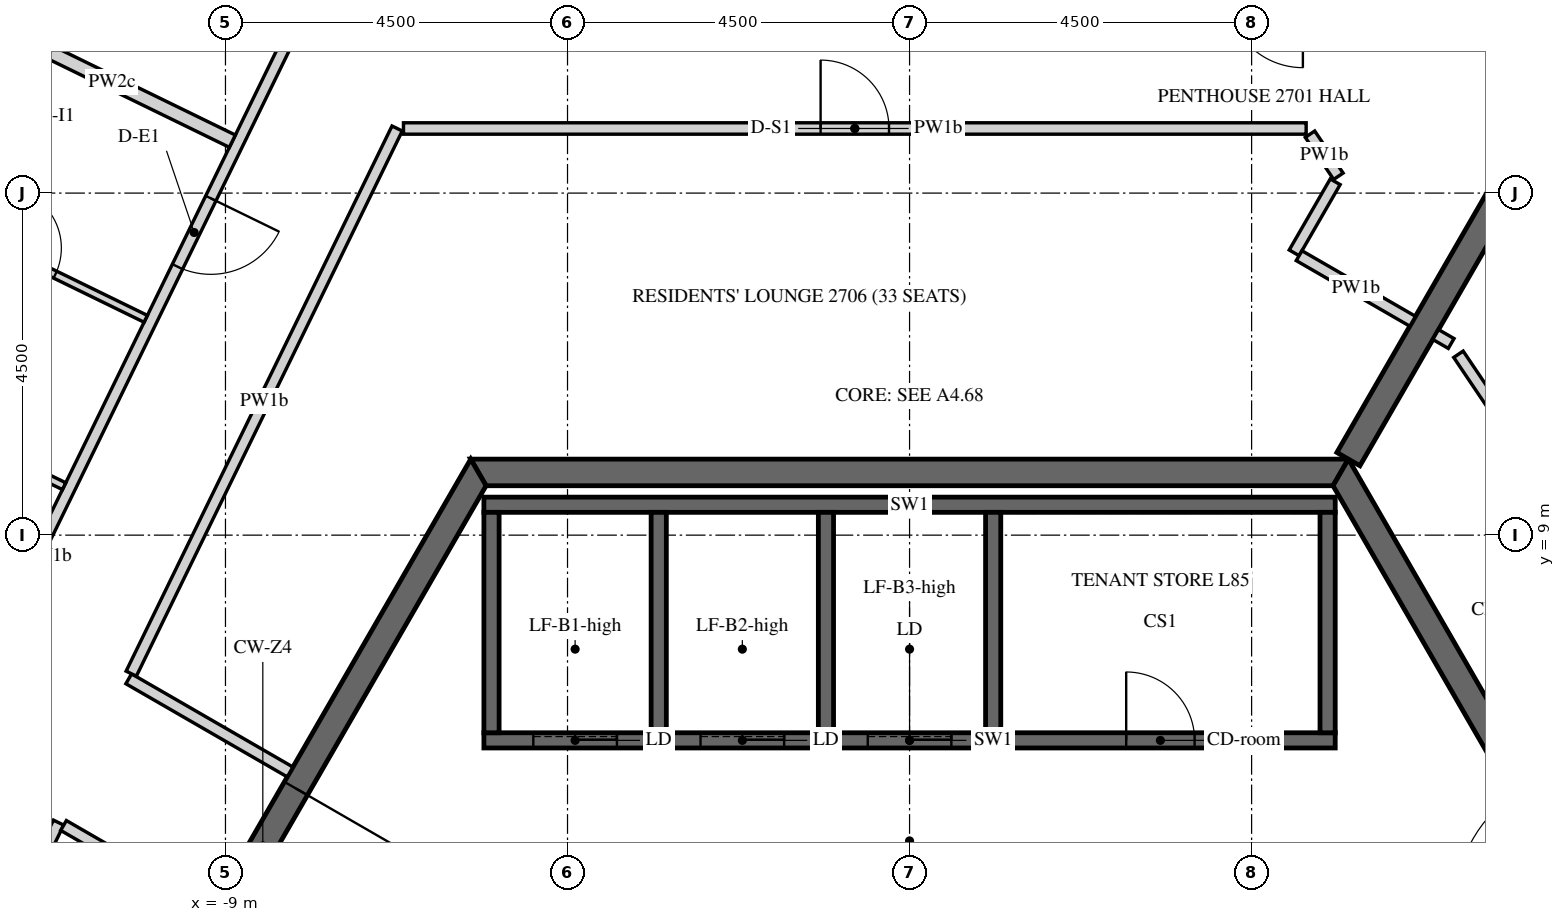
"""IFC4 building model, lengths in metres.
Left out: names, types, materials, properties, quantities, classifications, styles, units other than length and angle.
Written with IfcOpenShell. Run it as: python <this file> out.ifc"""

import sys

from ifc_helpers import new_model, si_unit, direction, frame, frame_2d, origin, place, context, subcontext, project, spatial, polyline, rectangle, outline, extrude, element, fill, save


model = new_model("IFC4")
c1 = context("Model", 3, precision=1e-05, world=origin(), true_north=direction((0.0, 1.0)))
c2 = subcontext(c1, "Body", "Model", "MODEL_VIEW")
j1 = project(units=[si_unit("LENGTHUNIT", "METRE"), si_unit("PLANEANGLEUNIT", "RADIAN")], contexts=[c1])
p1 = place(None, origin())
s1 = spatial("IfcSite", under=j1, at=p1, CompositionType="ELEMENT")
p2 = place(p1, origin())
s2 = spatial("IfcBuilding", under=s1, at=p2, CompositionType="ELEMENT")
p3 = place(p2, frame((0.0, 0.0, 353.4)))
s3 = spatial("IfcBuildingStorey", under=s2, at=p3, CompositionType="ELEMENT", Elevation=353.4)
p4 = place(p3, frame((-5.673, 9.825, -0.15), z_axis=(0.0, 0.0, 1.0), x_axis=(-0.499995046907, -0.866028263435, 0.0)))
e1 = element("IfcWall", 1, at=p4, inside=s3, PredefinedType="SHEAR", context=c2, shape_type="SweptSolid", body=[
    extrude(outline(polyline([(-0.101, -0.175), (11.446, -0.175), (11.244, 0.175), (0.101, 0.175), (-0.101, -0.175)])), origin(), (0.0, 0.0, 1.0), 3.9),
])
p5 = place(p4, frame((4.801, 0.0, 0.15)))
e2 = element("IfcOpeningElement", 2, at=p5, cuts=e1, PredefinedType="OPENING", context=c2, shape_type="SweptSolid", body=[
    extrude(rectangle(XDim=1.8, YDim=2.4, at=frame_2d((0.9, 1.2))), frame((0.0, 0.185, 0.0), z_axis=(0.0, -1.0, 0.0), x_axis=(1.0, 0.0, 0.0)), (0.0, 0.0, 1.0), 0.37),
])
p6 = place(p3, frame((11.345, 0.0, -0.15), z_axis=(0.0, 0.0, 1.0), x_axis=(-0.499995046907, 0.866028263435, 0.0)))
e3 = element("IfcWall", 3, at=p6, inside=s3, PredefinedType="SHEAR", context=c2, shape_type="SweptSolid", body=[
    extrude(outline(polyline([(-0.101, -0.175), (11.446, -0.175), (11.244, 0.175), (0.101, 0.175), (-0.101, -0.175)])), origin(), (0.0, 0.0, 1.0), 3.9),
])
p7 = place(p6, frame((4.744, 0.0, 0.15)))
e4 = element("IfcOpeningElement", 4, at=p7, cuts=e3, PredefinedType="OPENING", context=c2, shape_type="SweptSolid", body=[
    extrude(rectangle(XDim=1.8, YDim=2.4, at=frame_2d((0.9, 1.2))), frame((0.0, 0.185, 0.0), z_axis=(0.0, -1.0, 0.0), x_axis=(1.0, 0.0, 0.0)), (0.0, 0.0, 1.0), 0.37),
])
p8 = place(p3, frame((5.673, 9.825, -0.15), z_axis=(0.0, 0.0, 1.0), x_axis=(-1.0, 0.0, 0.0)))
e5 = element("IfcWall", 5, at=p8, inside=s3, PredefinedType="SHEAR", context=c2, shape_type="SweptSolid", body=[
    extrude(outline(polyline([(-0.101, -0.175), (11.446, -0.175), (11.244, 0.175), (0.101, 0.175), (-0.101, -0.175)])), origin(), (0.0, 0.0, 1.0), 3.9),
])
p9 = place(p3, frame((5.773, 10.0, -0.15), z_axis=(0.0, 0.0, 1.0), x_axis=(0.500007911273, 0.866020836161, 0.0)))
e6 = element("IfcWall", 6, at=p9, inside=s3, PredefinedType="SHEAR", context=c2, shape_type="SweptSolid", body=[
    extrude(rectangle(XDim=14.51, YDim=0.35, at=frame_2d((7.255, 0.0))), origin(), (0.0, 0.0, 1.0), 3.9),
])
p10 = place(p9, frame((6.355, 0.0, 0.15)))
e7 = element("IfcOpeningElement", 7, at=p10, cuts=e6, PredefinedType="OPENING", context=c2, shape_type="SweptSolid", body=[
    extrude(rectangle(XDim=1.8, YDim=2.4, at=frame_2d((0.9, 1.2))), frame((0.0, 0.185, 0.0), z_axis=(0.0, -1.0, 0.0), x_axis=(1.0, 0.0, 0.0)), (0.0, 0.0, 1.0), 0.37),
])
p11 = place(p3, frame((-5.6, 6.3, -0.25), z_axis=(0.0, 0.0, 1.0), x_axis=(1.0, 0.0, 0.0)))
e8 = element("IfcWall", 8, at=p11, inside=s3, PredefinedType="SHEAR", context=c2, shape_type="SweptSolid", body=[
    extrude(rectangle(XDim=11.2, YDim=0.2, at=frame_2d((5.6, 0.0))), origin(), (0.0, 0.0, 1.0), 3.9),
])
p12 = place(p11, frame((8.45, 0.0, 0.25)))
e9 = element("IfcOpeningElement", 9, at=p12, cuts=e8, PredefinedType="OPENING", context=c2, shape_type="SweptSolid", body=[
    extrude(rectangle(XDim=0.9, YDim=2.1, at=frame_2d((0.45, 1.05))), frame((0.0, 0.11, 0.0), z_axis=(0.0, -1.0, 0.0), x_axis=(1.0, 0.0, 0.0)), (0.0, 0.0, 1.0), 0.22),
])
p13 = place(p11, frame((0.65, 0.0, 0.25)))
e10 = element("IfcOpeningElement", 10, at=p13, cuts=e8, PredefinedType="OPENING", context=c2, shape_type="SweptSolid", body=[
    extrude(rectangle(XDim=1.1, YDim=2.1, at=frame_2d((0.55, 1.05))), frame((0.0, 0.11, 0.0), z_axis=(0.0, -1.0, 0.0), x_axis=(1.0, 0.0, 0.0)), (0.0, 0.0, 1.0), 0.22),
])
p14 = place(p11, frame((2.85, 0.0, 0.25)))
e11 = element("IfcOpeningElement", 11, at=p14, cuts=e8, PredefinedType="OPENING", context=c2, shape_type="SweptSolid", body=[
    extrude(rectangle(XDim=1.1, YDim=2.1, at=frame_2d((0.55, 1.05))), frame((0.0, 0.11, 0.0), z_axis=(0.0, -1.0, 0.0), x_axis=(1.0, 0.0, 0.0)), (0.0, 0.0, 1.0), 0.22),
])
p15 = place(p11, frame((5.05, 0.0, 0.25)))
e12 = element("IfcOpeningElement", 12, at=p15, cuts=e8, PredefinedType="OPENING", context=c2, shape_type="SweptSolid", body=[
    extrude(rectangle(XDim=1.1, YDim=2.1, at=frame_2d((0.55, 1.05))), frame((0.0, 0.11, 0.0), z_axis=(0.0, -1.0, 0.0), x_axis=(1.0, 0.0, 0.0)), (0.0, 0.0, 1.0), 0.22),
])
p16 = place(p3, frame((-5.6, 9.4, -0.25), z_axis=(0.0, 0.0, 1.0), x_axis=(1.0, 0.0, 0.0)))
e13 = element("IfcWall", 13, at=p16, inside=s3, PredefinedType="SHEAR", context=c2, shape_type="SweptSolid", body=[
    extrude(rectangle(XDim=11.2, YDim=0.2, at=frame_2d((5.6, 0.0))), origin(), (0.0, 0.0, 1.0), 3.9),
])
for number, where, z_axis, x_axis in (
    (14, (-5.5, 6.4, -0.25), (0.0, 0.0, 1.0), (0.0, 1.0, 0.0)),
    (15, (-3.3, 6.4, -0.25), (0.0, 0.0, 1.0), (0.0, 1.0, 0.0)),
    (16, (-1.1, 6.4, -0.25), (0.0, 0.0, 1.0), (0.0, 1.0, 0.0)),
    (17, (1.1, 6.4, -0.25), (0.0, 0.0, 1.0), (0.0, 1.0, 0.0)),
    (18, (5.5, 6.4, -0.25), (0.0, 0.0, 1.0), (0.0, 1.0, 0.0)),
):
    element("IfcWall", number, at=place(p3, frame(where, z_axis=z_axis, x_axis=x_axis)), inside=s3, PredefinedType="SHEAR", context=c2, shape_type="SweptSolid", body=[
        extrude(rectangle(XDim=2.9, YDim=0.2, at=frame_2d((1.45, 0.0))), origin(), (0.0, 0.0, 1.0), 3.9),
    ])
p17 = place(p3, frame((-7.903, 16.075, 0.0), z_axis=(0.0, 0.0, 1.0), x_axis=(-0.438364761272, -0.898797160696, 0.0)))
e19 = element("IfcWall", 19, at=p17, inside=s3, PredefinedType="PARTITIONING", context=c2, shape_type="SweptSolid", body=[
    extrude(rectangle(XDim=15.688, YDim=0.15, at=frame_2d((7.844, 0.0))), origin(), (0.0, 0.0, 1.0), 2.82),
])
p18 = place(p17, frame((2.942, 0.0, 0.0)))
e20 = element("IfcOpeningElement", 20, at=p18, cuts=e19, PredefinedType="OPENING", context=c2, shape_type="SweptSolid", body=[
    extrude(rectangle(XDim=1.0, YDim=2.1, at=frame_2d((0.5, 1.05))), frame((0.0, 0.085, 0.0), z_axis=(0.0, -1.0, 0.0), x_axis=(1.0, 0.0, 0.0)), (0.0, 0.0, 1.0), 0.17),
])
p19 = place(p3, frame((-13.466, 0.564, 0.0), z_axis=(0.0, 0.0, 1.0), x_axis=(0.438366040624, 0.898796536724, 0.0)))
e21 = element("IfcWall", 21, at=p19, inside=s3, PredefinedType="PARTITIONING", context=c2, shape_type="SweptSolid", body=[
    extrude(rectangle(XDim=5.178, YDim=0.15, at=frame_2d((2.589, 0.0))), origin(), (0.0, 0.0, 1.0), 2.82),
])
p20 = place(p3, frame((-11.131, 5.18, 0.0), z_axis=(0.0, 0.0, 1.0), x_axis=(0.866037886895, -0.499978377995, 0.0)))
e22 = element("IfcWall", 22, at=p20, inside=s3, PredefinedType="PARTITIONING", context=c2, shape_type="SweptSolid", body=[
    extrude(rectangle(XDim=2.229, YDim=0.15, at=frame_2d((1.115, 0.0))), origin(), (0.0, 0.0, 1.0), 2.82),
])
p21 = place(p3, frame((-8.15, 5.884, 0.0), z_axis=(0.0, 0.0, 1.0), x_axis=(-0.866009790468, 0.500027042082, 0.0)))
e23 = element("IfcWall", 23, at=p21, inside=s3, PredefinedType="PARTITIONING", context=c2, shape_type="SweptSolid", body=[
    extrude(rectangle(XDim=2.451, YDim=0.15, at=frame_2d((1.226, 0.0))), origin(), (0.0, 0.0, 1.0), 2.82),
])
p22 = place(p3, frame((-10.24, 7.178, 0.0), z_axis=(0.0, 0.0, 1.0), x_axis=(0.438356120288, 0.898801375058, 0.0)))
e24 = element("IfcWall", 24, at=p22, inside=s3, PredefinedType="PARTITIONING", context=c2, shape_type="SweptSolid", body=[
    extrude(rectangle(XDim=7.98, YDim=0.15, at=frame_2d((3.99, 0.0))), origin(), (0.0, 0.0, 1.0), 2.82),
])
p23 = place(p3, frame((-6.658, 14.35, 0.0), z_axis=(0.0, 0.0, 1.0), x_axis=(1.0, 0.0, 0.0)))
e25 = element("IfcWall", 25, at=p23, inside=s3, PredefinedType="PARTITIONING", context=c2, shape_type="SweptSolid", body=[
    extrude(rectangle(XDim=11.876, YDim=0.15, at=frame_2d((5.938, 0.0))), origin(), (0.0, 0.0, 1.0), 2.82),
])
p24 = place(p23, frame((5.488, 0.0, 0.0)))
e26 = element("IfcOpeningElement", 26, at=p24, cuts=e25, PredefinedType="OPENING", context=c2, shape_type="SweptSolid", body=[
    extrude(rectangle(XDim=0.9, YDim=2.1, at=frame_2d((0.45, 1.05))), frame((0.0, 0.085, 0.0), z_axis=(0.0, -1.0, 0.0), x_axis=(1.0, 0.0, 0.0)), (0.0, 0.0, 1.0), 0.17),
])
p25 = place(p3, frame((5.268, 14.275, 0.0), z_axis=(0.0, 0.0, 1.0), x_axis=(0.559416337009, -0.828886820915, 0.0)))
e27 = element("IfcWall", 27, at=p25, inside=s3, PredefinedType="PARTITIONING", context=c2, shape_type="SweptSolid", body=[
    extrude(rectangle(XDim=0.668, YDim=0.15, at=frame_2d((0.334, 0.0))), origin(), (0.0, 0.0, 1.0), 2.82),
])
p26 = place(p3, frame((5.6, 13.649, 0.0), z_axis=(0.0, 0.0, 1.0), x_axis=(-0.500126914667, -0.865952117167, 0.0)))
e28 = element("IfcWall", 28, at=p26, inside=s3, PredefinedType="PARTITIONING", context=c2, shape_type="SweptSolid", body=[
    extrude(rectangle(XDim=1.08, YDim=0.15, at=frame_2d((0.54, 0.0))), origin(), (0.0, 0.0, 1.0), 2.82),
])
p27 = place(p3, frame((5.125, 12.677, 0.0), z_axis=(0.0, 0.0, 1.0), x_axis=(0.866013532718, -0.500020560727, 0.0)))
e29 = element("IfcWall", 29, at=p27, inside=s3, PredefinedType="PARTITIONING", context=c2, shape_type="SweptSolid", body=[
    extrude(rectangle(XDim=1.725, YDim=0.15, at=frame_2d((0.863, 0.0))), origin(), (0.0, 0.0, 1.0), 2.82),
])
p28 = place(p3, frame((6.922, 11.639, 0.0), z_axis=(0.0, 0.0, 1.0), x_axis=(0.866254745882, -0.499602557277, 0.0)))
e30 = element("IfcWall", 30, at=p28, inside=s3, PredefinedType="PARTITIONING", context=c2, shape_type="SweptSolid", body=[
    extrude(rectangle(XDim=0.235, YDim=0.15, at=frame_2d((0.118, 0.0))), origin(), (0.0, 0.0, 1.0), 2.82),
])
p29 = place(p3, frame((7.221, 11.38, 0.0), z_axis=(0.0, 0.0, 1.0), x_axis=(0.559200548931, -0.829032415576, 0.0)))
e31 = element("IfcWall", 31, at=p29, inside=s3, PredefinedType="PARTITIONING", context=c2, shape_type="SweptSolid", body=[
    extrude(rectangle(XDim=5.236, YDim=0.15, at=frame_2d((2.618, 0.0))), origin(), (0.0, 0.0, 1.0), 2.82),
])
p30 = place(p29, frame((2.168, 0.0, 0.0)))
e32 = element("IfcOpeningElement", 32, at=p30, cuts=e31, PredefinedType="OPENING", context=c2, shape_type="SweptSolid", body=[
    extrude(rectangle(XDim=0.9, YDim=2.1, at=frame_2d((0.45, 1.05))), frame((0.0, 0.085, 0.0), z_axis=(0.0, -1.0, 0.0), x_axis=(1.0, 0.0, 0.0)), (0.0, 0.0, 1.0), 0.17),
])
p31 = place(p3, frame((-12.078, 15.728, 0.0), z_axis=(0.0, 0.0, 1.0), x_axis=(0.898802391248, -0.438354036696, 0.0)))
e33 = element("IfcWall", 33, at=p31, inside=s3, PredefinedType="PARTITIONING", context=c2, shape_type="SweptSolid", body=[
    extrude(rectangle(XDim=3.525, YDim=0.18, at=frame_2d((1.762, 0.0))), origin(), (0.0, 0.0, 1.0), 2.82),
])
p32 = place(p3, frame((-13.217, 13.391, 0.0), z_axis=(0.0, 0.0, 1.0), x_axis=(0.898775101867, -0.438409986501, 0.0)))
e34 = element("IfcWall", 34, at=p32, inside=s3, PredefinedType="PARTITIONING", context=c2, shape_type="SweptSolid", body=[
    extrude(rectangle(XDim=3.525, YDim=0.1, at=frame_2d((1.763, 0.0))), origin(), (0.0, 0.0, 1.0), 2.82),
])
p33 = place(p32, frame((1.4, 0.0, 0.0)))
e35 = element("IfcOpeningElement", 35, at=p33, cuts=e34, PredefinedType="OPENING", context=c2, shape_type="SweptSolid", body=[
    extrude(rectangle(XDim=0.8, YDim=2.1, at=frame_2d((0.4, 1.05))), frame((0.0, 0.06, 0.0), z_axis=(0.0, -1.0, 0.0), x_axis=(1.0, 0.0, 0.0)), (0.0, 0.0, 1.0), 0.12),
])
p34 = place(p3, frame((-14.246, 11.167, 0.0), z_axis=(0.0, 0.0, 1.0), x_axis=(0.89880963085, -0.438339192283, 0.0)))
e36 = element("IfcWall", 36, at=p34, inside=s3, PredefinedType="PARTITIONING", context=c2, shape_type="SweptSolid", body=[
    extrude(rectangle(XDim=3.475, YDim=0.1, at=frame_2d((1.737, 0.0))), origin(), (0.0, 0.0, 1.0), 2.82),
])
p35 = place(p5, origin())
e37 = element("IfcDoor", 37, at=p35, inside=s3, OperationType="DOUBLE_DOOR_SINGLE_SWING", PredefinedType="DOOR", context=c2, shape_type="SweptSolid", body=[
    extrude(rectangle(XDim=1.8, YDim=2.4, at=frame_2d((0.9, 1.2))), frame((0.0, 0.025, 0.0), z_axis=(0.0, -1.0, 0.0), x_axis=(1.0, 0.0, 0.0)), (0.0, 0.0, 1.0), 0.05),
])
fill(e2, e37)
p36 = place(p12, origin())
e38 = element("IfcDoor", 38, at=p36, inside=s3, OperationType="SINGLE_SWING_LEFT", PredefinedType="DOOR", context=c2, shape_type="SweptSolid", body=[
    extrude(rectangle(XDim=0.9, YDim=2.1, at=frame_2d((0.45, 1.05))), frame((0.0, 0.025, 0.0), z_axis=(0.0, -1.0, 0.0), x_axis=(1.0, 0.0, 0.0)), (0.0, 0.0, 1.0), 0.05),
])
fill(e9, e38)
p37 = place(p13, origin())
e39 = element("IfcDoor", 39, at=p37, inside=s3, OperationType="SLIDING_TO_LEFT", PredefinedType="DOOR", context=c2, shape_type="SweptSolid", body=[
    extrude(rectangle(XDim=1.1, YDim=2.1, at=frame_2d((0.55, 1.05))), frame((0.0, 0.025, 0.0), z_axis=(0.0, -1.0, 0.0), x_axis=(1.0, 0.0, 0.0)), (0.0, 0.0, 1.0), 0.05),
])
fill(e10, e39)
p38 = place(p14, origin())
e40 = element("IfcDoor", 40, at=p38, inside=s3, OperationType="SLIDING_TO_LEFT", PredefinedType="DOOR", context=c2, shape_type="SweptSolid", body=[
    extrude(rectangle(XDim=1.1, YDim=2.1, at=frame_2d((0.55, 1.05))), frame((0.0, 0.025, 0.0), z_axis=(0.0, -1.0, 0.0), x_axis=(1.0, 0.0, 0.0)), (0.0, 0.0, 1.0), 0.05),
])
fill(e11, e40)
p39 = place(p15, origin())
e41 = element("IfcDoor", 41, at=p39, inside=s3, OperationType="SLIDING_TO_LEFT", PredefinedType="DOOR", context=c2, shape_type="SweptSolid", body=[
    extrude(rectangle(XDim=1.1, YDim=2.1, at=frame_2d((0.55, 1.05))), frame((0.0, 0.025, 0.0), z_axis=(0.0, -1.0, 0.0), x_axis=(1.0, 0.0, 0.0)), (0.0, 0.0, 1.0), 0.05),
])
fill(e12, e41)
p40 = place(p18, origin())
e42 = element("IfcDoor", 42, at=p40, inside=s3, OperationType="SINGLE_SWING_LEFT", PredefinedType="DOOR", context=c2, shape_type="SweptSolid", body=[
    extrude(rectangle(XDim=1.0, YDim=2.1, at=frame_2d((0.5, 1.05))), frame((0.0, 0.025, 0.0), z_axis=(0.0, -1.0, 0.0), x_axis=(1.0, 0.0, 0.0)), (0.0, 0.0, 1.0), 0.05),
])
fill(e20, e42)
p41 = place(p33, origin())
e43 = element("IfcDoor", 43, at=p41, inside=s3, OperationType="SINGLE_SWING_LEFT", PredefinedType="DOOR", context=c2, shape_type="SweptSolid", body=[
    extrude(rectangle(XDim=0.8, YDim=2.1, at=frame_2d((0.4, 1.05))), frame((0.0, 0.025, 0.0), z_axis=(0.0, -1.0, 0.0), x_axis=(1.0, 0.0, 0.0)), (0.0, 0.0, 1.0), 0.05),
])
fill(e35, e43)
p42 = place(p24, origin())
e44 = element("IfcDoor", 44, at=p42, inside=s3, OperationType="SINGLE_SWING_RIGHT", PredefinedType="DOOR", context=c2, shape_type="SweptSolid", body=[
    extrude(rectangle(XDim=0.9, YDim=2.1, at=frame_2d((0.45, 1.05))), frame((0.0, 0.025, 0.0), z_axis=(0.0, -1.0, 0.0), x_axis=(1.0, 0.0, 0.0)), (0.0, 0.0, 1.0), 0.05),
])
fill(e26, e44)
save(model, sys.argv[1])
